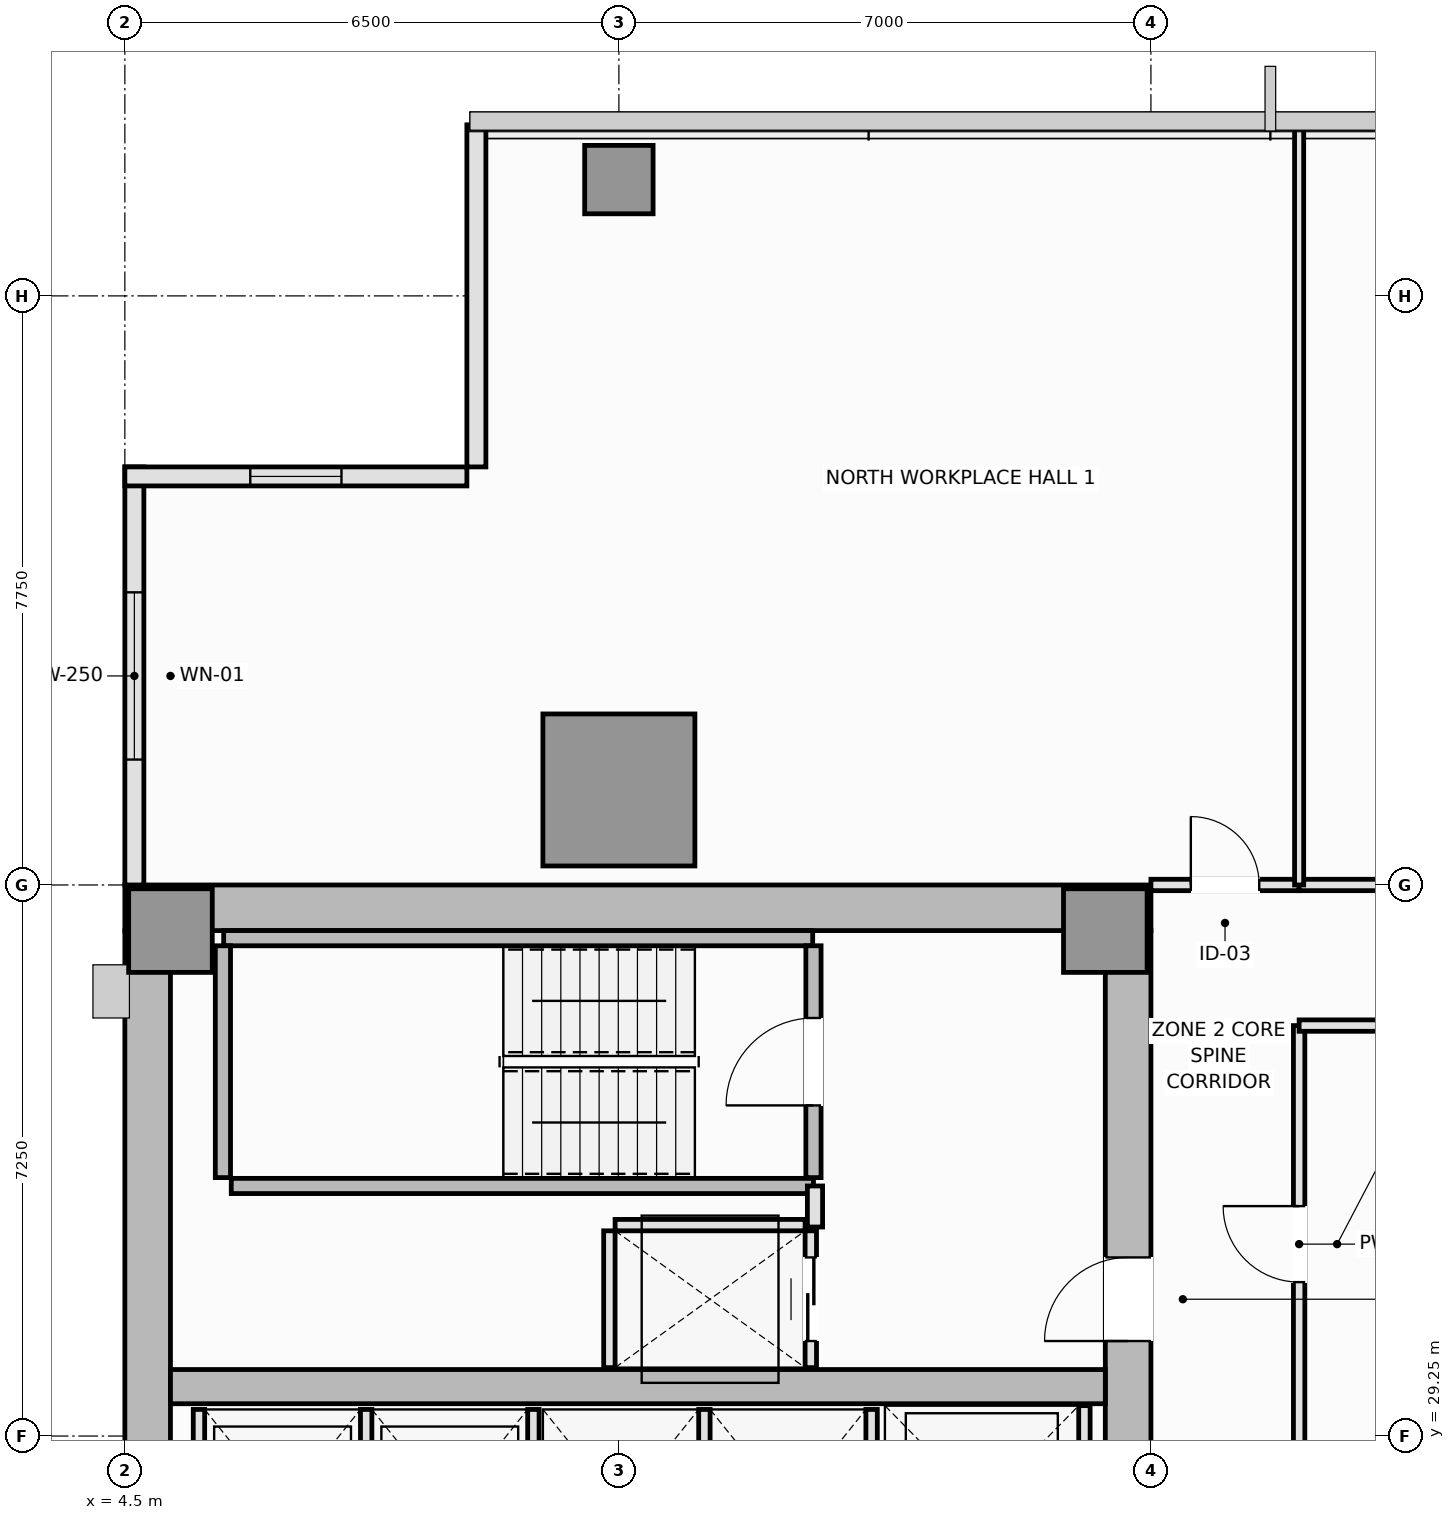
"""IFC4 building model, lengths in metres.
Left out: names, types, materials, properties, quantities, classifications, styles, units other than length and angle.
Written with IfcOpenShell. Run it as: python <this file> out.ifc"""

import sys

from ifc_helpers import new_model, si_unit, direction, frame, frame_2d, origin, origin_2d, place, context, subcontext, project, spatial, rectangle, extrude, element, fill, save


model = new_model("IFC4")
c1 = context("Model", 3, precision=1e-05, world=origin(), true_north=direction((0.0, 1.0)))
c2 = subcontext(c1, "Body", "Model", "MODEL_VIEW")
j1 = project(units=[si_unit("LENGTHUNIT", "METRE"), si_unit("PLANEANGLEUNIT", "RADIAN")], contexts=[c1])
p1 = place(None, origin())
s1 = spatial("IfcSite", under=j1, at=p1, CompositionType="ELEMENT")
p2 = place(p1, origin())
s2 = spatial("IfcBuilding", under=s1, at=p2, CompositionType="ELEMENT")
p3 = place(p2, frame((0.0, 0.0, 137.75)))
s3 = spatial("IfcBuildingStorey", under=s2, at=p3, CompositionType="ELEMENT", Elevation=137.75)
p4 = place(p3, frame((4.5, 36.2, 0.0), z_axis=(0.0, 0.0, 1.0), x_axis=(1.0, 0.0, 0.0)))
e1 = element("IfcWall", 1, at=p4, inside=s3, PredefinedType="SHEAR", context=c2, shape_type="SweptSolid", body=[
    extrude(rectangle(XDim=13.5, YDim=0.6, at=frame_2d((6.75, 0.0))), origin(), (0.0, 0.0, 1.0), 3.55),
])
p5 = place(p3, frame((4.8, 14.6, 0.0), z_axis=(0.0, 0.0, 1.0), x_axis=(0.0, 1.0, 0.0)))
e2 = element("IfcWall", 2, at=p5, inside=s3, PredefinedType="SHEAR", context=c2, shape_type="SweptSolid", body=[
    extrude(rectangle(XDim=21.3, YDim=0.6, at=frame_2d((10.65, 0.0))), origin(), (0.0, 0.0, 1.0), 3.55),
])
p6 = place(p3, frame((17.7, 27.05, 0.0), z_axis=(0.0, 0.0, 1.0), x_axis=(0.0, 1.0, 0.0)))
e3 = element("IfcWall", 3, at=p6, inside=s3, PredefinedType="SHEAR", context=c2, shape_type="SweptSolid", body=[
    extrude(rectangle(XDim=8.85, YDim=0.6, at=frame_2d((4.425, 0.0))), origin(), (0.0, 0.0, 1.0), 3.55),
])
p7 = place(p6, frame((3.45, 0.0, 0.0)))
e4 = element("IfcOpeningElement", 4, at=p7, cuts=e3, PredefinedType="OPENING", context=c2, shape_type="SweptSolid", body=[
    extrude(rectangle(XDim=1.1, YDim=2.15, at=frame_2d((0.55, 1.075))), frame((0.0, 0.31, 0.0), z_axis=(0.0, -1.0, 0.0), x_axis=(1.0, 0.0, 0.0)), (0.0, 0.0, 1.0), 0.62),
])
p8 = place(p3, frame((5.1, 29.9, 0.0), z_axis=(0.0, 0.0, 1.0), x_axis=(1.0, 0.0, 0.0)))
e5 = element("IfcWall", 5, at=p8, inside=s3, PredefinedType="SHEAR", context=c2, shape_type="SweptSolid", body=[
    extrude(rectangle(XDim=12.3, YDim=0.45, at=frame_2d((6.15, 0.0))), origin(), (0.0, 0.0, 1.0), 3.55),
])
for number, where, z_axis, x_axis in (
    (6, (5.1, 35.9, 0.0), (0.0, 0.0, 1.0), (1.0, 0.0, 0.0)),
    (7, (17.4, 35.9, 0.0), (0.0, 0.0, 1.0), (1.0, 0.0, 0.0)),
):
    element("IfcColumn", number, at=place(p3, frame(where, z_axis=z_axis, x_axis=x_axis)), inside=s3, PredefinedType="PILASTER", context=c2, shape_type="SweptSolid", body=[
        extrude(rectangle(XDim=1.1, YDim=1.1, at=origin_2d()), origin(), (0.0, 0.0, 1.0), 3.55),
    ])
p9 = place(p3, frame((11.0, 37.75, 0.0), z_axis=(0.0, 0.0, 1.0), x_axis=(1.0, 0.0, 0.0)))
e8 = element("IfcColumn", 8, at=p9, inside=s3, PredefinedType="COLUMN", context=c2, shape_type="SweptSolid", body=[
    extrude(rectangle(XDim=2.0, YDim=2.0, at=origin_2d()), origin(), (0.0, 0.0, 1.0), 3.55),
])
p10 = place(p3, frame((11.0, 45.78, 0.0), z_axis=(0.0, 0.0, 1.0), x_axis=(1.0, 0.0, 0.0)))
e9 = element("IfcColumn", 9, at=p10, inside=s3, PredefinedType="COLUMN", context=c2, shape_type="SweptSolid", body=[
    extrude(rectangle(XDim=0.9, YDim=0.9, at=origin_2d()), origin(), (0.0, 0.0, 1.0), 3.55),
])
p11 = place(p3, frame((4.625, 42.0, 0.0), z_axis=(0.0, 0.0, 1.0), x_axis=(0.0, -1.0, 0.0)))
e10 = element("IfcWall", 10, at=p11, inside=s3, PredefinedType="SOLIDWALL", context=c2, shape_type="SweptSolid", body=[
    extrude(rectangle(XDim=5.5, YDim=0.25, at=frame_2d((2.75, 0.0))), origin(), (0.0, 0.0, 1.0), 3.37),
])
p12 = place(p11, frame((1.65, 0.0, 0.9)))
e11 = element("IfcOpeningElement", 11, at=p12, cuts=e10, PredefinedType="OPENING", context=c2, shape_type="SweptSolid", body=[
    extrude(rectangle(XDim=2.2, YDim=1.8, at=frame_2d((1.1, 0.9))), frame((0.0, 0.135, 0.0), z_axis=(0.0, -1.0, 0.0), x_axis=(1.0, 0.0, 0.0)), (0.0, 0.0, 1.0), 0.27),
])
p13 = place(p3, frame((9.125, 46.5, 0.0), z_axis=(0.0, 0.0, 1.0), x_axis=(0.0, -1.0, 0.0)))
e12 = element("IfcWall", 12, at=p13, inside=s3, PredefinedType="SOLIDWALL", context=c2, shape_type="SweptSolid", body=[
    extrude(rectangle(XDim=4.5, YDim=0.25, at=frame_2d((2.25, 0.0))), origin(), (0.0, 0.0, 1.0), 3.37),
])
p14 = place(p3, frame((9.0, 41.875, 0.0), z_axis=(0.0, 0.0, 1.0), x_axis=(-1.0, 0.0, 0.0)))
e13 = element("IfcWall", 13, at=p14, inside=s3, PredefinedType="SOLIDWALL", context=c2, shape_type="SweptSolid", body=[
    extrude(rectangle(XDim=4.5, YDim=0.25, at=frame_2d((2.25, 0.0))), origin(), (0.0, 0.0, 1.0), 3.37),
])
p15 = place(p14, frame((1.65, 0.0, 0.9)))
e14 = element("IfcOpeningElement", 14, at=p15, cuts=e13, PredefinedType="OPENING", context=c2, shape_type="SweptSolid", body=[
    extrude(rectangle(XDim=1.2, YDim=1.8, at=frame_2d((0.6, 0.9))), frame((0.0, 0.135, 0.0), z_axis=(0.0, -1.0, 0.0), x_axis=(1.0, 0.0, 0.0)), (0.0, 0.0, 1.0), 0.27),
])
p16 = place(p3, frame((5.8, 35.8, 0.0), z_axis=(0.0, 0.0, 1.0), x_axis=(1.0, 0.0, 0.0)))
e15 = element("IfcWall", 15, at=p16, inside=s3, PredefinedType="SOLIDWALL", context=c2, shape_type="SweptSolid", body=[
    extrude(rectangle(XDim=7.75, YDim=0.2, at=frame_2d((3.875, 0.0))), origin(), (0.0, 0.0, 1.0), 3.55),
])
p17 = place(p3, frame((5.79, 32.65, 0.0), z_axis=(0.0, 0.0, 1.0), x_axis=(0.0, 1.0, 0.0)))
e16 = element("IfcWall", 16, at=p17, inside=s3, PredefinedType="SOLIDWALL", context=c2, shape_type="SweptSolid", body=[
    extrude(rectangle(XDim=3.05, YDim=0.2, at=frame_2d((1.525, 0.0))), origin(), (0.0, 0.0, 1.0), 3.55),
])
p18 = place(p3, frame((5.9, 32.54, 0.0), z_axis=(0.0, 0.0, 1.0), x_axis=(1.0, 0.0, 0.0)))
e17 = element("IfcWall", 17, at=p18, inside=s3, PredefinedType="SOLIDWALL", context=c2, shape_type="SweptSolid", body=[
    extrude(rectangle(XDim=7.66, YDim=0.2, at=frame_2d((3.83, 0.0))), origin(), (0.0, 0.0, 1.0), 3.55),
])
p19 = place(p3, frame((13.56, 32.65, 0.0), z_axis=(0.0, 0.0, 1.0), x_axis=(0.0, 1.0, 0.0)))
e18 = element("IfcWall", 18, at=p19, inside=s3, PredefinedType="SOLIDWALL", context=c2, shape_type="SweptSolid", body=[
    extrude(rectangle(XDim=3.05, YDim=0.2, at=frame_2d((1.525, 0.0))), origin(), (0.0, 0.0, 1.0), 3.55),
])
p20 = place(p19, frame((0.95, 0.0, 0.0)))
e19 = element("IfcOpeningElement", 19, at=p20, cuts=e18, PredefinedType="OPENING", context=c2, shape_type="SweptSolid", body=[
    extrude(rectangle(XDim=1.15, YDim=2.15, at=frame_2d((0.575, 1.075))), frame((0.0, 0.11, 0.0), z_axis=(0.0, -1.0, 0.0), x_axis=(1.0, 0.0, 0.0)), (0.0, 0.0, 1.0), 0.22),
])
for number, where, z_axis, x_axis in (
    (20, (5.475, 27.05, 0.0), (0.0, 0.0, 1.0), (0.0, 1.0, 0.0)),
    (21, (7.675, 27.05, 0.0), (0.0, 0.0, 1.0), (0.0, 1.0, 0.0)),
    (22, (9.875, 27.05, 0.0), (0.0, 0.0, 1.0), (0.0, 1.0, 0.0)),
    (23, (12.125, 27.05, 0.0), (0.0, 0.0, 1.0), (0.0, 1.0, 0.0)),
    (24, (14.325, 27.05, 0.0), (0.0, 0.0, 1.0), (0.0, 1.0, 0.0)),
):
    element("IfcWall", number, at=place(p3, frame(where, z_axis=z_axis, x_axis=x_axis)), inside=s3, PredefinedType="PARTITIONING", context=c2, shape_type="SweptSolid", body=[
        extrude(rectangle(XDim=2.55, YDim=0.15, at=frame_2d((1.275, 0.0))), origin(), (0.0, 0.0, 1.0), 3.37),
    ])
p21 = place(p3, frame((17.125, 27.05, 0.0), z_axis=(0.0, 0.0, 1.0), x_axis=(0.0, 1.0, 0.0)))
e25 = element("IfcWall", 25, at=p21, inside=s3, PredefinedType="PARTITIONING", context=c2, shape_type="SweptSolid", body=[
    extrude(rectangle(XDim=2.6, YDim=0.15, at=frame_2d((1.3, 0.0))), origin(), (0.0, 0.0, 1.0), 3.37),
])
p22 = place(p3, frame((10.95, 32.025, 0.0), z_axis=(0.0, 0.0, 1.0), x_axis=(1.0, 0.0, 0.0)))
e26 = element("IfcWall", 26, at=p22, inside=s3, PredefinedType="PARTITIONING", context=c2, shape_type="SweptSolid", body=[
    extrude(rectangle(XDim=2.5, YDim=0.15, at=frame_2d((1.25, 0.0))), origin(), (0.0, 0.0, 1.0), 3.37),
])
p23 = place(p3, frame((10.875, 30.15, 0.0), z_axis=(0.0, 0.0, 1.0), x_axis=(0.0, 1.0, 0.0)))
e27 = element("IfcWall", 27, at=p23, inside=s3, PredefinedType="PARTITIONING", context=c2, shape_type="SweptSolid", body=[
    extrude(rectangle(XDim=1.8, YDim=0.15, at=frame_2d((0.9, 0.0))), origin(), (0.0, 0.0, 1.0), 3.37),
])
p24 = place(p3, frame((13.525, 30.15, 0.0), z_axis=(0.0, 0.0, 1.0), x_axis=(0.0, 1.0, 0.0)))
e28 = element("IfcWall", 28, at=p24, inside=s3, PredefinedType="PARTITIONING", context=c2, shape_type="SweptSolid", body=[
    extrude(rectangle(XDim=1.8, YDim=0.15, at=frame_2d((0.9, 0.0))), origin(), (0.0, 0.0, 1.0), 3.37),
])
p25 = place(p24, frame((0.35, 0.0, 0.0)))
e29 = element("IfcOpeningElement", 29, at=p25, cuts=e28, PredefinedType="OPENING", context=c2, shape_type="SweptSolid", body=[
    extrude(rectangle(XDim=1.1, YDim=2.2, at=frame_2d((0.55, 1.1))), frame((0.0, 0.085, 0.0), z_axis=(0.0, -1.0, 0.0), x_axis=(1.0, 0.0, 0.0)), (0.0, 0.0, 1.0), 0.17),
])
p26 = place(p3, frame((13.58, 32.0, 0.0), z_axis=(0.0, 0.0, 1.0), x_axis=(0.0, 1.0, 0.0)))
e30 = element("IfcWall", 30, at=p26, inside=s3, PredefinedType="PARTITIONING", context=c2, shape_type="SweptSolid", body=[
    extrude(rectangle(XDim=0.54, YDim=0.2, at=frame_2d((0.27, 0.0))), origin(), (0.0, 0.0, 1.0), 3.37),
])
p27 = place(p3, frame((19.95, 28.9, 0.0), z_axis=(0.0, 0.0, 1.0), x_axis=(0.0, 1.0, 0.0)))
e31 = element("IfcWall", 31, at=p27, inside=s3, PredefinedType="PARTITIONING", context=c2, shape_type="SweptSolid", body=[
    extrude(rectangle(XDim=5.75, YDim=0.15, at=frame_2d((2.875, 0.0))), origin(), (0.0, 0.0, 1.0), 3.37),
])
p28 = place(p27, frame((2.375, 0.0, 0.0)))
e32 = element("IfcOpeningElement", 32, at=p28, cuts=e31, PredefinedType="OPENING", context=c2, shape_type="SweptSolid", body=[
    extrude(rectangle(XDim=1.0, YDim=2.15, at=frame_2d((0.5, 1.075))), frame((0.0, 0.085, 0.0), z_axis=(0.0, -1.0, 0.0), x_axis=(1.0, 0.0, 0.0)), (0.0, 0.0, 1.0), 0.17),
])
p29 = place(p3, frame((18.0, 36.5, 0.0), z_axis=(0.0, 0.0, 1.0), x_axis=(1.0, 0.0, 0.0)))
e33 = element("IfcWall", 33, at=p29, inside=s3, PredefinedType="PARTITIONING", context=c2, shape_type="SweptSolid", body=[
    extrude(rectangle(XDim=1.95, YDim=0.15, at=frame_2d((0.975, 0.0))), origin(), (0.0, 0.0, 1.0), 3.37),
])
p30 = place(p29, frame((0.525, 0.0, 0.0)))
e34 = element("IfcOpeningElement", 34, at=p30, cuts=e33, PredefinedType="OPENING", context=c2, shape_type="SweptSolid", body=[
    extrude(rectangle(XDim=0.9, YDim=2.1, at=frame_2d((0.45, 1.05))), frame((0.0, 0.085, 0.0), z_axis=(0.0, -1.0, 0.0), x_axis=(1.0, 0.0, 0.0)), (0.0, 0.0, 1.0), 0.17),
])
p31 = place(p3, frame((19.95, 34.65, 0.0), z_axis=(0.0, 0.0, 1.0), x_axis=(1.0, 0.0, 0.0)))
e35 = element("IfcWall", 35, at=p31, inside=s3, PredefinedType="PARTITIONING", context=c2, shape_type="SweptSolid", body=[
    extrude(rectangle(XDim=7.55, YDim=0.15, at=frame_2d((3.775, 0.0))), origin(), (0.0, 0.0, 1.0), 3.37),
])
p32 = place(p3, frame((19.95, 36.5, 0.0), z_axis=(0.0, 0.0, 1.0), x_axis=(1.0, 0.0, 0.0)))
e36 = element("IfcWall", 36, at=p32, inside=s3, PredefinedType="PARTITIONING", context=c2, shape_type="SweptSolid", body=[
    extrude(rectangle(XDim=7.55, YDim=0.15, at=frame_2d((3.775, 0.0))), origin(), (0.0, 0.0, 1.0), 3.37),
])
p33 = place(p32, frame((3.275, 0.0, 0.0)))
e37 = element("IfcOpeningElement", 37, at=p33, cuts=e36, PredefinedType="OPENING", context=c2, shape_type="SweptSolid", body=[
    extrude(rectangle(XDim=1.0, YDim=2.15, at=frame_2d((0.5, 1.075))), frame((0.0, 0.085, 0.0), z_axis=(0.0, -1.0, 0.0), x_axis=(1.0, 0.0, 0.0)), (0.0, 0.0, 1.0), 0.17),
])
p34 = place(p3, frame((19.95, 36.5, 0.0), z_axis=(0.0, 0.0, 1.0), x_axis=(0.0, 1.0, 0.0)))
e38 = element("IfcWall", 38, at=p34, inside=s3, PredefinedType="PARTITIONING", context=c2, shape_type="SweptSolid", body=[
    extrude(rectangle(XDim=9.99, YDim=0.12, at=frame_2d((4.995, 0.0))), origin(), (0.0, 0.0, 1.0), 3.37),
])
p35 = place(p12, origin())
e39 = element("IfcWindow", 39, at=p35, inside=s3, PartitioningType="SINGLE_PANEL", PredefinedType="WINDOW", context=c2, shape_type="SweptSolid", body=[
    extrude(rectangle(XDim=2.2, YDim=1.8, at=frame_2d((1.1, 0.9))), frame((0.0, 0.03, 0.0), z_axis=(0.0, -1.0, 0.0), x_axis=(1.0, 0.0, 0.0)), (0.0, 0.0, 1.0), 0.06),
])
fill(e11, e39)
p36 = place(p15, origin())
e40 = element("IfcWindow", 40, at=p36, inside=s3, PartitioningType="SINGLE_PANEL", PredefinedType="WINDOW", context=c2, shape_type="SweptSolid", body=[
    extrude(rectangle(XDim=1.2, YDim=1.8, at=frame_2d((0.6, 0.9))), frame((0.0, 0.03, 0.0), z_axis=(0.0, -1.0, 0.0), x_axis=(1.0, 0.0, 0.0)), (0.0, 0.0, 1.0), 0.06),
])
fill(e14, e40)
p37 = place(p20, origin())
e41 = element("IfcDoor", 41, at=p37, inside=s3, OperationType="SINGLE_SWING_LEFT", PredefinedType="DOOR", context=c2, shape_type="SweptSolid", body=[
    extrude(rectangle(XDim=1.15, YDim=2.15, at=frame_2d((0.575, 1.075))), frame((0.0, 0.025, 0.0), z_axis=(0.0, -1.0, 0.0), x_axis=(1.0, 0.0, 0.0)), (0.0, 0.0, 1.0), 0.05),
])
fill(e19, e41)
p38 = place(p25, origin())
e42 = element("IfcDoor", 42, at=p38, inside=s3, OperationType="DOUBLE_DOOR_SLIDING", PredefinedType="DOOR", context=c2, shape_type="SweptSolid", body=[
    extrude(rectangle(XDim=1.1, YDim=2.2, at=frame_2d((0.55, 1.1))), frame((0.0, 0.025, 0.0), z_axis=(0.0, -1.0, 0.0), x_axis=(1.0, 0.0, 0.0)), (0.0, 0.0, 1.0), 0.05),
])
fill(e29, e42)
p39 = place(p7, origin())
e43 = element("IfcDoor", 43, at=p39, inside=s3, OperationType="SINGLE_SWING_LEFT", PredefinedType="DOOR", context=c2, shape_type="SweptSolid", body=[
    extrude(rectangle(XDim=1.1, YDim=2.15, at=frame_2d((0.55, 1.075))), frame((0.0, 0.025, 0.0), z_axis=(0.0, -1.0, 0.0), x_axis=(1.0, 0.0, 0.0)), (0.0, 0.0, 1.0), 0.05),
])
fill(e4, e43)
p40 = place(p28, origin())
e44 = element("IfcDoor", 44, at=p40, inside=s3, OperationType="SINGLE_SWING_RIGHT", PredefinedType="DOOR", context=c2, shape_type="SweptSolid", body=[
    extrude(rectangle(XDim=1.0, YDim=2.15, at=frame_2d((0.5, 1.075))), frame((0.0, 0.025, 0.0), z_axis=(0.0, -1.0, 0.0), x_axis=(1.0, 0.0, 0.0)), (0.0, 0.0, 1.0), 0.05),
])
fill(e32, e44)
p41 = place(p30, origin())
e45 = element("IfcDoor", 45, at=p41, inside=s3, OperationType="SINGLE_SWING_LEFT", PredefinedType="DOOR", context=c2, shape_type="SweptSolid", body=[
    extrude(rectangle(XDim=0.9, YDim=2.1, at=frame_2d((0.45, 1.05))), frame((0.0, 0.025, 0.0), z_axis=(0.0, -1.0, 0.0), x_axis=(1.0, 0.0, 0.0)), (0.0, 0.0, 1.0), 0.05),
])
fill(e34, e45)
save(model, sys.argv[1])
